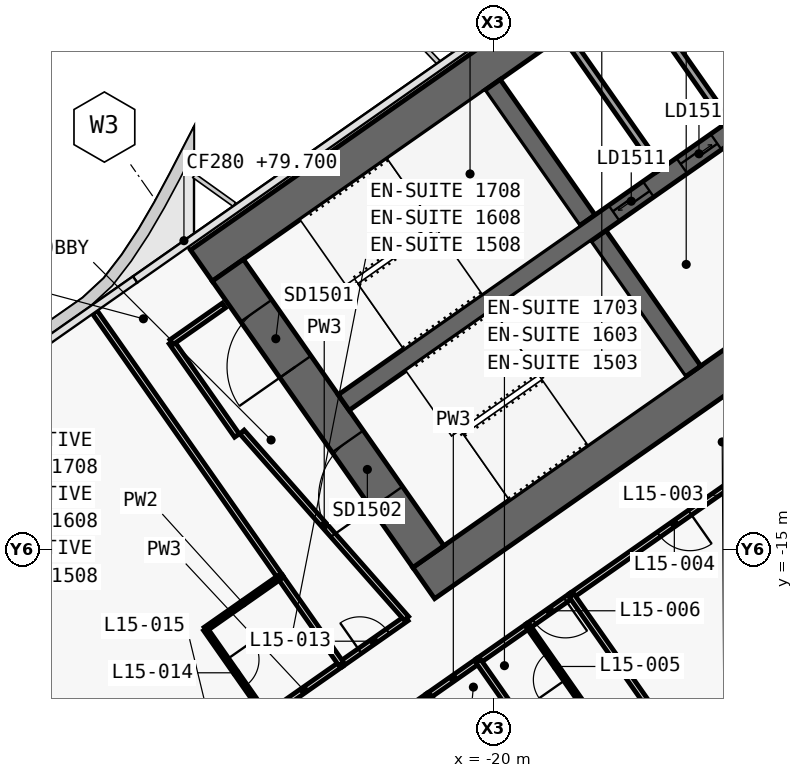
"""IFC4 building model, lengths in metres.
Left out: names, types, materials, properties, quantities, classifications, styles, units other than length and angle.
Written with IfcOpenShell. Run it as: python <this file> out.ifc"""

import sys

from ifc_helpers import new_model, si_unit, direction, frame, frame_2d, origin, place, context, subcontext, project, spatial, polyline, rectangle, outline, extrude, element, fill, save


model = new_model("IFC4")
c1 = context("Model", 3, precision=1e-05, world=origin(), true_north=direction((0.0, 1.0)))
c2 = subcontext(c1, "Body", "Model", "MODEL_VIEW")
j1 = project(units=[si_unit("LENGTHUNIT", "METRE"), si_unit("PLANEANGLEUNIT", "RADIAN")], contexts=[c1])
p1 = place(None, origin())
s1 = spatial("IfcSite", under=j1, at=p1, CompositionType="ELEMENT")
p2 = place(p1, origin())
s2 = spatial("IfcBuilding", under=s1, at=p2, CompositionType="ELEMENT")
p3 = place(p2, frame((0.0, 0.0, 79.7)))
s3 = spatial("IfcBuildingStorey", under=s2, at=p3, CompositionType="ELEMENT", Elevation=79.7)
p4 = place(p3, frame((0.037, 11.867, 0.0), z_axis=(0.0, 0.0, 1.0), x_axis=(-0.819155306259, -0.573571777746, 0.0)))
e1 = element("IfcWall", 1, at=p4, inside=s3, PredefinedType="SHEAR", context=c2, shape_type="SweptSolid", body=[
    extrude(outline(polyline([(33.837, 0.5), (0.7, 0.5), (0.0, -0.5), (33.837, -0.5), (33.837, 0.5)])), origin(), (0.0, 0.0, 1.0), 3.6),
])
p5 = place(p3, frame((0.037, -0.585, 0.0), z_axis=(0.0, 0.0, 1.0), x_axis=(-0.819157152511, -0.573569140985, 0.0)))
e2 = element("IfcWall", 2, at=p5, inside=s3, PredefinedType="SHEAR", context=c2, shape_type="SweptSolid", body=[
    extrude(outline(polyline([(26.695, 0.5), (0.7, 0.5), (0.0, -0.5), (26.695, -0.5), (26.695, 0.5)])), origin(), (0.0, 0.0, 1.0), 3.6),
])
p6 = place(p5, frame((2.995, 0.0, 0.0)))
e3 = element("IfcOpeningElement", 3, at=p6, cuts=e2, PredefinedType="OPENING", context=c2, shape_type="SweptSolid", body=[
    extrude(rectangle(XDim=2.4, YDim=2.1, at=frame_2d((1.2, 1.05))), frame((0.0, 0.51, 0.0), z_axis=(0.0, -1.0, 0.0), x_axis=(1.0, 0.0, 0.0)), (0.0, 0.0, 1.0), 1.02),
])
p7 = place(p5, frame((11.995, 0.0, 0.0)))
e4 = element("IfcOpeningElement", 4, at=p7, cuts=e2, PredefinedType="OPENING", context=c2, shape_type="SweptSolid", body=[
    extrude(rectangle(XDim=2.4, YDim=2.1, at=frame_2d((1.2, 1.05))), frame((0.0, 0.51, 0.0), z_axis=(0.0, -1.0, 0.0), x_axis=(1.0, 0.0, 0.0)), (0.0, 0.0, 1.0), 1.02),
])
p8 = place(p3, frame((-21.708, -15.2, 0.0), z_axis=(0.0, 0.0, 1.0), x_axis=(-0.573576324356, 0.819152122709, 0.0)))
e5 = element("IfcWall", 5, at=p8, inside=s3, PredefinedType="SHEAR", context=c2, shape_type="SweptSolid", body=[
    extrude(outline(polyline([(0.0, 0.5), (0.0, -0.5), (9.2, -0.5), (9.2, 0.5), (0.0, 0.5)])), origin(), (0.0, 0.0, 1.0), 3.6),
])
p9 = place(p8, frame((6.1, 0.0, 0.0)))
e6 = element("IfcOpeningElement", 6, at=p9, cuts=e5, PredefinedType="OPENING", context=c2, shape_type="SweptSolid", body=[
    extrude(rectangle(XDim=1.8, YDim=2.1, at=frame_2d((0.9, 1.05))), frame((0.0, 0.51, 0.0), z_axis=(0.0, -1.0, 0.0), x_axis=(1.0, 0.0, 0.0)), (0.0, 0.0, 1.0), 1.02),
])
p10 = place(p8, frame((1.9, 0.0, 0.0)))
e7 = element("IfcOpeningElement", 7, at=p10, cuts=e5, PredefinedType="OPENING", context=c2, shape_type="SweptSolid", body=[
    extrude(rectangle(XDim=1.8, YDim=2.1, at=frame_2d((0.9, 1.05))), frame((0.0, 0.51, 0.0), z_axis=(0.0, -1.0, 0.0), x_axis=(1.0, 0.0, 0.0)), (0.0, 0.0, 1.0), 1.02),
])
p11 = place(p3, frame((-14.745, -10.324, 0.0), z_axis=(0.0, 0.0, 1.0), x_axis=(-0.57356780395, 0.819158088694, 0.0)))
e8 = element("IfcWall", 8, at=p11, inside=s3, PredefinedType="SHEAR", context=c2, shape_type="SweptSolid", body=[
    extrude(outline(polyline([(4.35, 0.25), (0.0, 0.25), (0.0, -0.25), (4.35, -0.25), (4.35, 0.25)])), origin(), (0.0, 0.0, 1.0), 3.6),
])
p12 = place(p3, frame((-17.527, -6.352, 0.0), z_axis=(0.0, 0.0, 1.0), x_axis=(-0.573530143085, 0.819184457233, 0.0)))
e9 = element("IfcWall", 9, at=p12, inside=s3, PredefinedType="SHEAR", context=c2, shape_type="SweptSolid", body=[
    extrude(outline(polyline([(4.35, -0.25), (4.35, 0.25), (0.0, 0.25), (0.0, -0.25), (4.35, -0.25)])), origin(), (0.0, 0.0, 1.0), 3.6),
])
p13 = place(p3, frame((-2.638, 3.768, 0.0), z_axis=(0.0, 0.0, 1.0), x_axis=(-0.819148977158, -0.573580816643, 0.0)))
e10 = element("IfcWall", 10, at=p13, inside=s3, PredefinedType="SHEAR", context=c2, shape_type="SweptSolid", body=[
    extrude(outline(polyline([(26.0, 0.25), (0.0, 0.25), (0.0, -0.25), (26.0, -0.25), (26.0, 0.25)])), origin(), (0.0, 0.0, 1.0), 3.6),
])
p14 = place(p13, frame((1.169, 0.0, 0.0)))
e11 = element("IfcOpeningElement", 11, at=p14, cuts=e10, PredefinedType="OPENING", context=c2, shape_type="SweptSolid", body=[
    extrude(rectangle(XDim=1.1, YDim=2.1, at=frame_2d((0.55, 1.05))), frame((0.0, 0.26, 0.0), z_axis=(0.0, -1.0, 0.0), x_axis=(1.0, 0.0, 0.0)), (0.0, 0.0, 1.0), 0.52),
])
p15 = place(p13, frame((3.206, 0.0, 0.0)))
e12 = element("IfcOpeningElement", 12, at=p15, cuts=e10, PredefinedType="OPENING", context=c2, shape_type="SweptSolid", body=[
    extrude(rectangle(XDim=1.1, YDim=2.1, at=frame_2d((0.55, 1.05))), frame((0.0, 0.26, 0.0), z_axis=(0.0, -1.0, 0.0), x_axis=(1.0, 0.0, 0.0)), (0.0, 0.0, 1.0), 0.52),
])
p16 = place(p13, frame((5.244, 0.0, 0.0)))
e13 = element("IfcOpeningElement", 13, at=p16, cuts=e10, PredefinedType="OPENING", context=c2, shape_type="SweptSolid", body=[
    extrude(rectangle(XDim=1.1, YDim=2.1, at=frame_2d((0.55, 1.05))), frame((0.0, 0.26, 0.0), z_axis=(0.0, -1.0, 0.0), x_axis=(1.0, 0.0, 0.0)), (0.0, 0.0, 1.0), 0.52),
])
p17 = place(p13, frame((7.281, 0.0, 0.0)))
e14 = element("IfcOpeningElement", 14, at=p17, cuts=e10, PredefinedType="OPENING", context=c2, shape_type="SweptSolid", body=[
    extrude(rectangle(XDim=1.1, YDim=2.1, at=frame_2d((0.55, 1.05))), frame((0.0, 0.26, 0.0), z_axis=(0.0, -1.0, 0.0), x_axis=(1.0, 0.0, 0.0)), (0.0, 0.0, 1.0), 0.52),
])
p18 = place(p13, frame((9.688, 0.0, 0.0)))
e15 = element("IfcOpeningElement", 15, at=p18, cuts=e10, PredefinedType="OPENING", context=c2, shape_type="SweptSolid", body=[
    extrude(rectangle(XDim=1.1, YDim=2.1, at=frame_2d((0.55, 1.05))), frame((0.0, 0.26, 0.0), z_axis=(0.0, -1.0, 0.0), x_axis=(1.0, 0.0, 0.0)), (0.0, 0.0, 1.0), 0.52),
])
p19 = place(p13, frame((11.863, 0.0, 0.0)))
e16 = element("IfcOpeningElement", 16, at=p19, cuts=e10, PredefinedType="OPENING", context=c2, shape_type="SweptSolid", body=[
    extrude(rectangle(XDim=1.1, YDim=2.1, at=frame_2d((0.55, 1.05))), frame((0.0, 0.26, 0.0), z_axis=(0.0, -1.0, 0.0), x_axis=(1.0, 0.0, 0.0)), (0.0, 0.0, 1.0), 0.52),
])
p20 = place(p13, frame((14.038, 0.0, 0.0)))
e17 = element("IfcOpeningElement", 17, at=p20, cuts=e10, PredefinedType="OPENING", context=c2, shape_type="SweptSolid", body=[
    extrude(rectangle(XDim=1.1, YDim=2.1, at=frame_2d((0.55, 1.05))), frame((0.0, 0.26, 0.0), z_axis=(0.0, -1.0, 0.0), x_axis=(1.0, 0.0, 0.0)), (0.0, 0.0, 1.0), 0.52),
])
p21 = place(p13, frame((16.212, 0.0, 0.0)))
e18 = element("IfcOpeningElement", 18, at=p21, cuts=e10, PredefinedType="OPENING", context=c2, shape_type="SweptSolid", body=[
    extrude(rectangle(XDim=1.1, YDim=2.1, at=frame_2d((0.55, 1.05))), frame((0.0, 0.26, 0.0), z_axis=(0.0, -1.0, 0.0), x_axis=(1.0, 0.0, 0.0)), (0.0, 0.0, 1.0), 0.52),
])
p22 = place(p3, frame((-12.059, -2.523, 0.0), z_axis=(0.0, 0.0, 1.0), x_axis=(-0.573594173421, 0.819139624372, 0.0)))
e19 = element("IfcWall", 19, at=p22, inside=s3, PredefinedType="SOLIDWALL", context=c2, shape_type="SweptSolid", body=[
    extrude(rectangle(XDim=4.35, YDim=0.2, at=frame_2d((2.175, 0.0))), origin(), (0.0, 0.0, 1.0), 3.6),
])
p23 = place(p3, frame((-13.84, -3.771, 0.0), z_axis=(0.0, 0.0, 1.0), x_axis=(-0.57356780395, 0.819158088694, 0.0)))
e20 = element("IfcWall", 20, at=p23, inside=s3, PredefinedType="SOLIDWALL", context=c2, shape_type="SweptSolid", body=[
    extrude(rectangle(XDim=4.35, YDim=0.2, at=frame_2d((2.175, 0.0))), origin(), (0.0, 0.0, 1.0), 3.6),
])
p24 = place(p3, frame((-15.622, -5.018, 0.0), z_axis=(0.0, 0.0, 1.0), x_axis=(-0.573594173421, 0.819139624372, 0.0)))
e21 = element("IfcWall", 21, at=p24, inside=s3, PredefinedType="SOLIDWALL", context=c2, shape_type="SweptSolid", body=[
    extrude(rectangle(XDim=4.35, YDim=0.2, at=frame_2d((2.175, 0.0))), origin(), (0.0, 0.0, 1.0), 3.6),
])
p25 = place(p3, frame((-24.003, -18.028, 0.0), z_axis=(0.0, 0.0, 1.0), x_axis=(0.819160859995, 0.573563846013, 0.0)))
e22 = element("IfcWall", 22, at=p25, inside=s3, PredefinedType="PARTITIONING", context=c2, shape_type="SweptSolid", body=[
    extrude(rectangle(XDim=2.098, YDim=0.15, at=frame_2d((1.049, 0.0))), origin(), (0.0, 0.0, 1.0), 3.32),
])
p26 = place(p25, frame((0.599, 0.0, 0.0)))
e23 = element("IfcOpeningElement", 23, at=p26, cuts=e22, PredefinedType="OPENING", context=c2, shape_type="SweptSolid", body=[
    extrude(rectangle(XDim=0.9, YDim=2.1, at=frame_2d((0.45, 1.05))), frame((0.0, 0.085, 0.0), z_axis=(0.0, -1.0, 0.0), x_axis=(1.0, 0.0, 0.0)), (0.0, 0.0, 1.0), 0.17),
])
p27 = place(p3, frame((-25.969, -19.404, 0.0), z_axis=(0.0, 0.0, 1.0), x_axis=(0.819146032251, 0.573585022335, 0.0)))
e24 = element("IfcWall", 24, at=p27, inside=s3, PredefinedType="PARTITIONING", context=c2, shape_type="SweptSolid", body=[
    extrude(rectangle(XDim=2.404, YDim=0.15, at=frame_2d((1.202, 0.0))), origin(), (0.0, 0.0, 1.0), 3.32),
])
p28 = place(p3, frame((-12.532, -12.437, 0.0), z_axis=(0.0, 0.0, 1.0), x_axis=(-0.819153746897, -0.573574004767, 0.0)))
e25 = element("IfcWall", 25, at=p28, inside=s3, PredefinedType="PARTITIONING", context=c2, shape_type="SweptSolid", body=[
    extrude(rectangle(XDim=6.603, YDim=0.15, at=frame_2d((3.302, 0.0))), origin(), (0.0, 0.0, 1.0), 2.6),
])
p29 = place(p28, frame((2.801, 0.0, 0.0)))
e26 = element("IfcOpeningElement", 26, at=p29, cuts=e25, PredefinedType="OPENING", context=c2, shape_type="SweptSolid", body=[
    extrude(rectangle(XDim=1.0, YDim=2.1, at=frame_2d((0.5, 1.05))), frame((0.0, 0.085, 0.0), z_axis=(0.0, -1.0, 0.0), x_axis=(1.0, 0.0, 0.0)), (0.0, 0.0, 1.0), 0.17),
])
p30 = place(p3, frame((-17.937, -16.222, 0.0), z_axis=(0.0, 0.0, 1.0), x_axis=(-0.819199220913, -0.573509055252, 0.0)))
e27 = element("IfcWall", 27, at=p30, inside=s3, PredefinedType="PARTITIONING", context=c2, shape_type="SweptSolid", body=[
    extrude(rectangle(XDim=1.403, YDim=0.15, at=frame_2d((0.702, 0.0))), origin(), (0.0, 0.0, 1.0), 3.32),
])
p31 = place(p30, frame((0.202, 0.0, 0.0)))
e28 = element("IfcOpeningElement", 28, at=p31, cuts=e27, PredefinedType="OPENING", context=c2, shape_type="SweptSolid", body=[
    extrude(rectangle(XDim=1.0, YDim=2.1, at=frame_2d((0.5, 1.05))), frame((0.0, 0.085, 0.0), z_axis=(0.0, -1.0, 0.0), x_axis=(1.0, 0.0, 0.0)), (0.0, 0.0, 1.0), 0.17),
])
p32 = place(p3, frame((-19.084, -17.025, 0.0), z_axis=(0.0, 0.0, 1.0), x_axis=(-0.819117502046, -0.573625764625, 0.0)))
e29 = element("IfcWall", 29, at=p32, inside=s3, PredefinedType="PARTITIONING", context=c2, shape_type="SweptSolid", body=[
    extrude(rectangle(XDim=1.604, YDim=0.15, at=frame_2d((0.802, 0.0))), origin(), (0.0, 0.0, 1.0), 2.6),
])
p33 = place(p3, frame((-21.706, -18.861, 0.0), z_axis=(0.0, 0.0, 1.0), x_axis=(-0.819060210533, -0.573707566205, 0.0)))
e30 = element("IfcWall", 30, at=p33, inside=s3, PredefinedType="PARTITIONING", context=c2, shape_type="SweptSolid", body=[
    extrude(rectangle(XDim=1.403, YDim=0.15, at=frame_2d((0.702, 0.0))), origin(), (0.0, 0.0, 1.0), 3.32),
])
p34 = place(p33, frame((0.201, 0.0, 0.0)))
e31 = element("IfcOpeningElement", 31, at=p34, cuts=e30, PredefinedType="OPENING", context=c2, shape_type="SweptSolid", body=[
    extrude(rectangle(XDim=1.0, YDim=2.1, at=frame_2d((0.5, 1.05))), frame((0.0, 0.085, 0.0), z_axis=(0.0, -1.0, 0.0), x_axis=(1.0, 0.0, 0.0)), (0.0, 0.0, 1.0), 0.17),
])
p35 = place(p3, frame((-20.395, -17.943, 0.0), z_axis=(0.0, 0.0, 1.0), x_axis=(-0.819189013667, -0.573523634986, 0.0)))
e32 = element("IfcWall", 32, at=p35, inside=s3, PredefinedType="PARTITIONING", context=c2, shape_type="SweptSolid", body=[
    extrude(rectangle(XDim=1.604, YDim=0.15, at=frame_2d((0.802, 0.0))), origin(), (0.0, 0.0, 1.0), 2.6),
])
p36 = place(p3, frame((-26.746, -12.014, 0.0), z_axis=(0.0, 0.0, 1.0), x_axis=(-0.573560650686, 0.819163097304, 0.0)))
e33 = element("IfcWall", 33, at=p36, inside=s3, PredefinedType="PARTITIONING", context=c2, shape_type="SweptSolid", body=[
    extrude(rectangle(XDim=3.0, YDim=0.15, at=frame_2d((1.5, 0.0))), origin(), (0.0, 0.0, 1.0), 3.32),
])
p37 = place(p3, frame((-28.467, -9.556, 0.0), z_axis=(0.0, 0.0, 1.0), x_axis=(0.819109000826, 0.573637903879, 0.0)))
e34 = element("IfcWall", 34, at=p37, inside=s3, PredefinedType="PARTITIONING", context=c2, shape_type="SweptSolid", body=[
    extrude(rectangle(XDim=1.68, YDim=0.15, at=frame_2d((0.84, 0.0))), origin(), (0.0, 0.0, 1.0), 3.32),
])
p38 = place(p3, frame((-22.284, -16.827, 0.0), z_axis=(0.0, 0.0, 1.0), x_axis=(-0.661545117561, 0.749905365651, 0.0)))
e35 = element("IfcWall", 35, at=p38, inside=s3, PredefinedType="PARTITIONING", context=c2, shape_type="SweptSolid", body=[
    extrude(rectangle(XDim=6.543, YDim=0.15, at=frame_2d((3.271, 0.0))), origin(), (0.0, 0.0, 1.0), 2.6),
])
p39 = place(p3, frame((-25.606, -15.734, 0.0), z_axis=(0.0, 0.0, 1.0), x_axis=(-0.573576058406, 0.819152308929, 0.0)))
e36 = element("IfcWall", 36, at=p39, inside=s3, PredefinedType="PARTITIONING", context=c2, shape_type="SweptSolid", body=[
    extrude(rectangle(XDim=8.501, YDim=0.15, at=frame_2d((4.25, 0.0))), origin(), (0.0, 0.0, 1.0), 2.6),
])
p40 = place(p3, frame((-24.001, -18.026, 0.0), z_axis=(0.0, 0.0, 1.0), x_axis=(-0.573596837309, 0.819137759006, 0.0)))
e37 = element("IfcWall", 37, at=p40, inside=s3, PredefinedType="PARTITIONING", context=c2, shape_type="SweptSolid", body=[
    extrude(rectangle(XDim=2.802, YDim=0.15, at=frame_2d((1.401, 0.0))), origin(), (0.0, 0.0, 1.0), 2.6),
])
p41 = place(p3, frame((-25.608, -15.732, 0.0), z_axis=(0.0, 0.0, 1.0), x_axis=(-0.819107643868, -0.573639841501, 0.0)))
e38 = element("IfcWall", 38, at=p41, inside=s3, PredefinedType="PARTITIONING", context=c2, shape_type="SweptSolid", body=[
    extrude(rectangle(XDim=2.4, YDim=0.12, at=frame_2d((1.2, 0.0))), origin(), (0.0, 0.0, 1.0), 3.32),
])
p42 = place(p3, frame((-27.574, -17.11, 0.0), z_axis=(0.0, 0.0, 1.0), x_axis=(0.573591086599, -0.819141785879, 0.0)))
e39 = element("IfcWall", 39, at=p42, inside=s3, PredefinedType="PARTITIONING", context=c2, shape_type="SweptSolid", body=[
    extrude(rectangle(XDim=2.8, YDim=0.12, at=frame_2d((1.4, 0.0))), origin(), (0.0, 0.0, 1.0), 2.6),
])
p43 = place(p42, frame((0.975, 0.0, 0.0)))
e40 = element("IfcOpeningElement", 40, at=p43, cuts=e39, PredefinedType="OPENING", context=c2, shape_type="SweptSolid", body=[
    extrude(rectangle(XDim=0.85, YDim=2.05, at=frame_2d((0.425, 1.025))), frame((0.0, 0.07, 0.0), z_axis=(0.0, -1.0, 0.0), x_axis=(1.0, 0.0, 0.0)), (0.0, 0.0, 1.0), 0.14),
])
p44 = place(p3, frame((-31.373, -23.189, 0.0), z_axis=(0.0, 0.0, 1.0), x_axis=(-0.573571089604, 0.819155788095, 0.0)))
e41 = element("IfcWall", 41, at=p44, inside=s3, PredefinedType="PARTITIONING", context=c2, shape_type="SweptSolid", body=[
    extrude(rectangle(XDim=11.3, YDim=0.15, at=frame_2d((5.65, 0.0))), origin(), (0.0, 0.0, 1.0), 2.5),
])
p45 = place(p3, frame((-13.752, -22.203, 0.0), z_axis=(0.0, 0.0, 1.0), x_axis=(-0.573594765376, 0.819139209862, 0.0)))
e42 = element("IfcWall", 42, at=p45, inside=s3, PredefinedType="PARTITIONING", context=c2, shape_type="SweptSolid", body=[
    extrude(rectangle(XDim=7.3, YDim=0.15, at=frame_2d((3.65, 0.0))), origin(), (0.0, 0.0, 1.0), 2.5),
])
p46 = place(p3, frame((-17.594, -19.156, 0.0), z_axis=(0.0, 0.0, 1.0), x_axis=(-0.573600972199, 0.819134863556, 0.0)))
e43 = element("IfcWall", 43, at=p46, inside=s3, PredefinedType="PARTITIONING", context=c2, shape_type="SweptSolid", body=[
    extrude(rectangle(XDim=2.6, YDim=0.12, at=frame_2d((1.3, 0.0))), origin(), (0.0, 0.0, 1.0), 3.32),
])
p47 = place(p46, frame((0.875, 0.0, 0.0)))
e44 = element("IfcOpeningElement", 44, at=p47, cuts=e43, PredefinedType="OPENING", context=c2, shape_type="SweptSolid", body=[
    extrude(rectangle(XDim=0.85, YDim=2.05, at=frame_2d((0.425, 1.025))), frame((0.0, 0.07, 0.0), z_axis=(0.0, -1.0, 0.0), x_axis=(1.0, 0.0, 0.0)), (0.0, 0.0, 1.0), 0.14),
])
p48 = place(p3, frame((-18.905, -20.074, 0.0), z_axis=(0.0, 0.0, 1.0), x_axis=(-0.573645091666, 0.819103967032, 0.0)))
e45 = element("IfcWall", 45, at=p48, inside=s3, PredefinedType="PARTITIONING", context=c2, shape_type="SweptSolid", body=[
    extrude(rectangle(XDim=2.6, YDim=0.15, at=frame_2d((1.3, 0.0))), origin(), (0.0, 0.0, 1.0), 2.6),
])
p49 = place(p3, frame((-21.708, -18.862, 0.0), z_axis=(0.0, 0.0, 1.0), x_axis=(0.573537965655, -0.819178980414, 0.0)))
e46 = element("IfcWall", 46, at=p49, inside=s3, PredefinedType="PARTITIONING", context=c2, shape_type="SweptSolid", body=[
    extrude(rectangle(XDim=2.6, YDim=0.12, at=frame_2d((1.3, 0.0))), origin(), (0.0, 0.0, 1.0), 3.32),
])
p50 = place(p49, frame((0.875, 0.0, 0.0)))
e47 = element("IfcOpeningElement", 47, at=p50, cuts=e46, PredefinedType="OPENING", context=c2, shape_type="SweptSolid", body=[
    extrude(rectangle(XDim=0.85, YDim=2.05, at=frame_2d((0.425, 1.025))), frame((0.0, 0.07, 0.0), z_axis=(0.0, -1.0, 0.0), x_axis=(1.0, 0.0, 0.0)), (0.0, 0.0, 1.0), 0.14),
])
p51 = place(p20, origin())
e48 = element("IfcDoor", 48, at=p51, inside=s3, OperationType="SLIDING_TO_LEFT", PredefinedType="DOOR", context=c2, shape_type="SweptSolid", body=[
    extrude(rectangle(XDim=1.1, YDim=2.1, at=frame_2d((0.55, 1.05))), frame((0.0, 0.025, 0.0), z_axis=(0.0, -1.0, 0.0), x_axis=(1.0, 0.0, 0.0)), (0.0, 0.0, 1.0), 0.05),
])
fill(e17, e48)
p52 = place(p21, origin())
e49 = element("IfcDoor", 49, at=p52, inside=s3, OperationType="SLIDING_TO_RIGHT", PredefinedType="DOOR", context=c2, shape_type="SweptSolid", body=[
    extrude(rectangle(XDim=1.1, YDim=2.1, at=frame_2d((0.55, 1.05))), frame((0.0, 0.025, 0.0), z_axis=(0.0, -1.0, 0.0), x_axis=(1.0, 0.0, 0.0)), (0.0, 0.0, 1.0), 0.05),
])
fill(e18, e49)
p53 = place(p9, origin())
e50 = element("IfcDoor", 50, at=p53, inside=s3, OperationType="DOUBLE_DOOR_SINGLE_SWING", PredefinedType="DOOR", context=c2, shape_type="SweptSolid", body=[
    extrude(rectangle(XDim=1.8, YDim=2.1, at=frame_2d((0.9, 1.05))), frame((0.0, 0.025, 0.0), z_axis=(0.0, -1.0, 0.0), x_axis=(1.0, 0.0, 0.0)), (0.0, 0.0, 1.0), 0.05),
])
fill(e6, e50)
p54 = place(p10, origin())
e51 = element("IfcDoor", 51, at=p54, inside=s3, OperationType="DOUBLE_DOOR_SINGLE_SWING", PredefinedType="DOOR", context=c2, shape_type="SweptSolid", body=[
    extrude(rectangle(XDim=1.8, YDim=2.1, at=frame_2d((0.9, 1.05))), frame((0.0, 0.025, 0.0), z_axis=(0.0, -1.0, 0.0), x_axis=(1.0, 0.0, 0.0)), (0.0, 0.0, 1.0), 0.05),
])
fill(e7, e51)
p55 = place(p29, origin())
e52 = element("IfcDoor", 52, at=p55, inside=s3, OperationType="SINGLE_SWING_LEFT", PredefinedType="DOOR", context=c2, shape_type="SweptSolid", body=[
    extrude(rectangle(XDim=1.0, YDim=2.1, at=frame_2d((0.5, 1.05))), frame((0.0, 0.025, 0.0), z_axis=(0.0, -1.0, 0.0), x_axis=(1.0, 0.0, 0.0)), (0.0, 0.0, 1.0), 0.05),
])
fill(e26, e52)
p56 = place(p47, origin())
e53 = element("IfcDoor", 53, at=p56, inside=s3, OperationType="SINGLE_SWING_RIGHT", PredefinedType="DOOR", context=c2, shape_type="SweptSolid", body=[
    extrude(rectangle(XDim=0.85, YDim=2.05, at=frame_2d((0.425, 1.025))), frame((0.0, 0.025, 0.0), z_axis=(0.0, -1.0, 0.0), x_axis=(1.0, 0.0, 0.0)), (0.0, 0.0, 1.0), 0.05),
])
fill(e44, e53)
p57 = place(p31, origin())
e54 = element("IfcDoor", 54, at=p57, inside=s3, OperationType="SINGLE_SWING_LEFT", PredefinedType="DOOR", context=c2, shape_type="SweptSolid", body=[
    extrude(rectangle(XDim=1.0, YDim=2.1, at=frame_2d((0.5, 1.05))), frame((0.0, 0.025, 0.0), z_axis=(0.0, -1.0, 0.0), x_axis=(1.0, 0.0, 0.0)), (0.0, 0.0, 1.0), 0.05),
])
fill(e28, e54)
p58 = place(p26, origin())
e55 = element("IfcDoor", 55, at=p58, inside=s3, OperationType="SINGLE_SWING_LEFT", PredefinedType="DOOR", context=c2, shape_type="SweptSolid", body=[
    extrude(rectangle(XDim=0.9, YDim=2.1, at=frame_2d((0.45, 1.05))), frame((0.0, 0.025, 0.0), z_axis=(0.0, -1.0, 0.0), x_axis=(1.0, 0.0, 0.0)), (0.0, 0.0, 1.0), 0.05),
])
fill(e23, e55)
p59 = place(p43, origin())
e56 = element("IfcDoor", 56, at=p59, inside=s3, OperationType="SINGLE_SWING_RIGHT", PredefinedType="DOOR", context=c2, shape_type="SweptSolid", body=[
    extrude(rectangle(XDim=0.85, YDim=2.05, at=frame_2d((0.425, 1.025))), frame((0.0, 0.025, 0.0), z_axis=(0.0, -1.0, 0.0), x_axis=(1.0, 0.0, 0.0)), (0.0, 0.0, 1.0), 0.05),
])
fill(e40, e56)
save(model, sys.argv[1])
